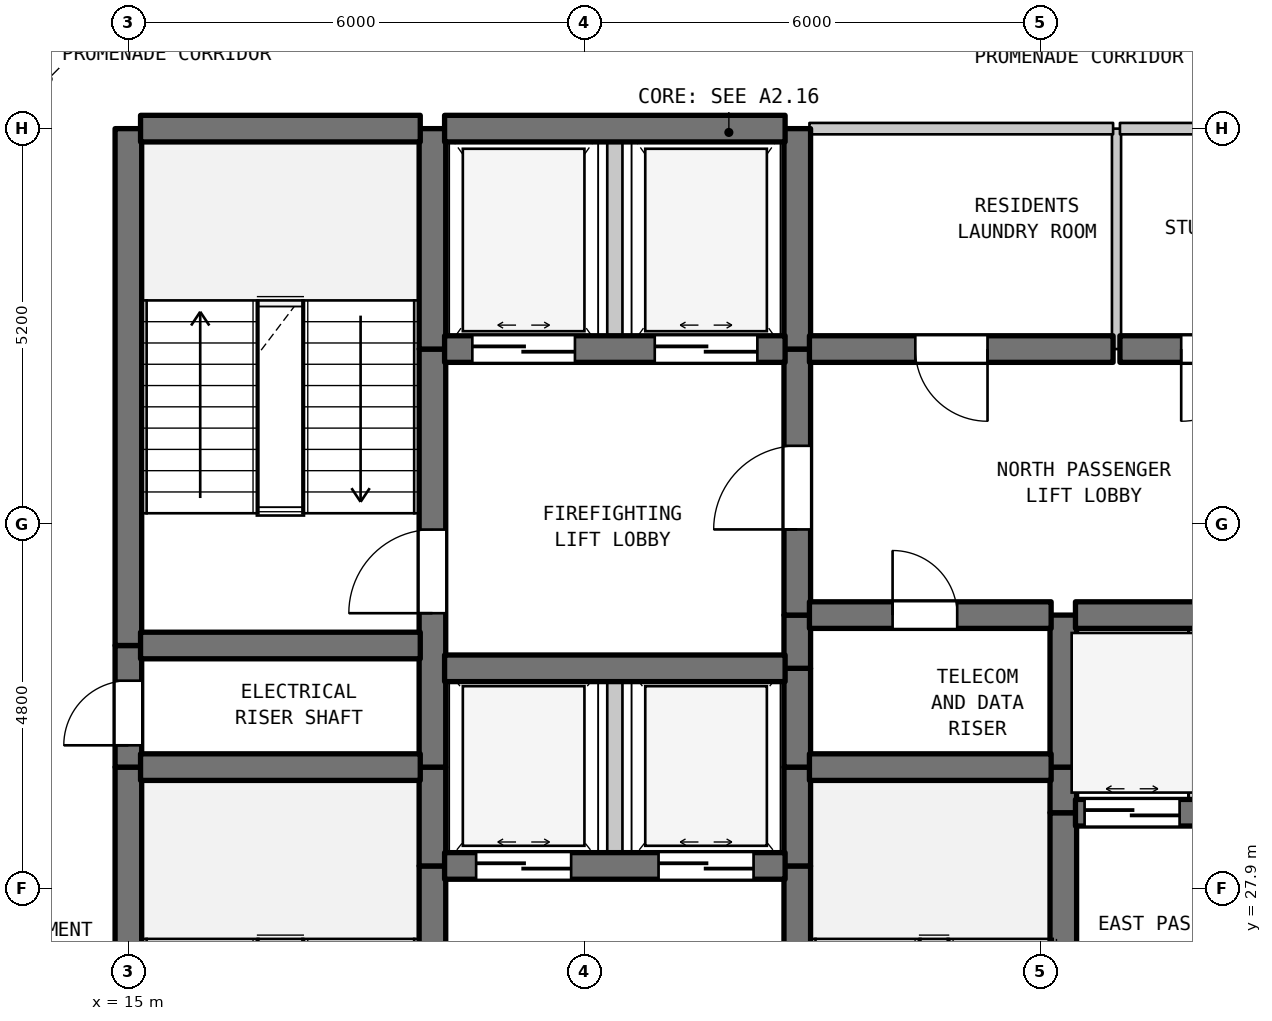
"""IFC4 building model, lengths in metres.
Left out: names, types, materials, properties, quantities, classifications, styles, units other than length and angle.
Written with IfcOpenShell. Run it as: python <this file> out.ifc"""

import sys

from ifc_helpers import new_model, si_unit, direction, frame, frame_2d, origin, place, context, subcontext, project, spatial, rectangle, extrude, element, fill, save


model = new_model("IFC4")
c1 = context("Model", 3, precision=1e-05, world=origin(), true_north=direction((0.0, 1.0)))
c2 = subcontext(c1, "Body", "Model", "MODEL_VIEW")
j1 = project(units=[si_unit("LENGTHUNIT", "METRE"), si_unit("PLANEANGLEUNIT", "RADIAN")], contexts=[c1])
p1 = place(None, origin())
s1 = spatial("IfcSite", under=j1, at=p1, CompositionType="ELEMENT")
p2 = place(p1, origin())
s2 = spatial("IfcBuilding", under=s1, at=p2, CompositionType="ELEMENT")
p3 = place(p2, frame((0.0, 0.0, 210.6)))
s3 = spatial("IfcBuildingStorey", under=s2, at=p3, CompositionType="ELEMENT", Elevation=210.6)
p4 = place(p3, frame((15.0, 22.7, 0.0), z_axis=(0.0, 0.0, 1.0), x_axis=(0.0, 1.0, 0.0)))
e1 = element("IfcWall", 1, at=p4, inside=s3, PredefinedType="SHEAR", context=c2, shape_type="SweptSolid", body=[
    extrude(rectangle(XDim=6.8, YDim=0.35, at=frame_2d((3.4, 0.0))), origin(), (0.0, 0.0, 1.0), 3.39),
])
p5 = place(p3, frame((15.0, 29.5, 0.0), z_axis=(0.0, 0.0, 1.0), x_axis=(0.0, 1.0, 0.0)))
e2 = element("IfcWall", 2, at=p5, inside=s3, PredefinedType="SHEAR", context=c2, shape_type="SweptSolid", body=[
    extrude(rectangle(XDim=1.6, YDim=0.35, at=frame_2d((0.8, 0.0))), origin(), (0.0, 0.0, 1.0), 3.39),
])
p6 = place(p5, frame((0.287, 0.0, 0.0)))
e3 = element("IfcOpeningElement", 3, at=p6, cuts=e2, PredefinedType="OPENING", context=c2, shape_type="SweptSolid", body=[
    extrude(rectangle(XDim=0.85, YDim=2.1, at=frame_2d((0.425, 1.05))), frame((0.0, 0.185, 0.0), z_axis=(0.0, -1.0, 0.0), x_axis=(1.0, 0.0, 0.0)), (0.0, 0.0, 1.0), 0.37),
])
p7 = place(p3, frame((15.0, 31.1, 0.0), z_axis=(0.0, 0.0, 1.0), x_axis=(0.0, 1.0, 0.0)))
e4 = element("IfcWall", 4, at=p7, inside=s3, PredefinedType="SHEAR", context=c2, shape_type="SweptSolid", body=[
    extrude(rectangle(XDim=6.8, YDim=0.35, at=frame_2d((3.4, 0.0))), origin(), (0.0, 0.0, 1.0), 3.39),
])
p8 = place(p3, frame((19.0, 22.7, 0.0), z_axis=(0.0, 0.0, 1.0), x_axis=(0.0, 1.0, 0.0)))
e5 = element("IfcWall", 5, at=p8, inside=s3, PredefinedType="SHEAR", context=c2, shape_type="SweptSolid", body=[
    extrude(rectangle(XDim=5.5, YDim=0.35, at=frame_2d((2.75, 0.0))), origin(), (0.0, 0.0, 1.0), 3.39),
])
p9 = place(p8, frame((0.631, 0.0, 0.0)))
e6 = element("IfcOpeningElement", 6, at=p9, cuts=e5, PredefinedType="OPENING", context=c2, shape_type="SweptSolid", body=[
    extrude(rectangle(XDim=1.1, YDim=2.15, at=frame_2d((0.55, 1.075))), frame((0.0, 0.185, 0.0), z_axis=(0.0, -1.0, 0.0), x_axis=(1.0, 0.0, 0.0)), (0.0, 0.0, 1.0), 0.37),
])
p10 = place(p3, frame((19.0, 28.2, 0.0), z_axis=(0.0, 0.0, 1.0), x_axis=(0.0, 1.0, 0.0)))
e7 = element("IfcWall", 7, at=p10, inside=s3, PredefinedType="SHEAR", context=c2, shape_type="SweptSolid", body=[
    extrude(rectangle(XDim=1.3, YDim=0.35, at=frame_2d((0.65, 0.0))), origin(), (0.0, 0.0, 1.0), 3.39),
])
p11 = place(p3, frame((19.0, 29.5, 0.0), z_axis=(0.0, 0.0, 1.0), x_axis=(0.0, 1.0, 0.0)))
e8 = element("IfcWall", 8, at=p11, inside=s3, PredefinedType="SHEAR", context=c2, shape_type="SweptSolid", body=[
    extrude(rectangle(XDim=5.5, YDim=0.35, at=frame_2d((2.75, 0.0))), origin(), (0.0, 0.0, 1.0), 3.39),
])
p12 = place(p11, frame((2.025, 0.0, 0.0)))
e9 = element("IfcOpeningElement", 9, at=p12, cuts=e8, PredefinedType="OPENING", context=c2, shape_type="SweptSolid", body=[
    extrude(rectangle(XDim=1.1, YDim=2.15, at=frame_2d((0.55, 1.075))), frame((0.0, 0.185, 0.0), z_axis=(0.0, -1.0, 0.0), x_axis=(1.0, 0.0, 0.0)), (0.0, 0.0, 1.0), 0.37),
])
p13 = place(p3, frame((19.0, 35.0, 0.0), z_axis=(0.0, 0.0, 1.0), x_axis=(0.0, 1.0, 0.0)))
e10 = element("IfcWall", 10, at=p13, inside=s3, PredefinedType="SHEAR", context=c2, shape_type="SweptSolid", body=[
    extrude(rectangle(XDim=2.9, YDim=0.35, at=frame_2d((1.45, 0.0))), origin(), (0.0, 0.0, 1.0), 3.39),
])
p14 = place(p3, frame((21.4, 28.2, 0.0), z_axis=(0.0, 0.0, 1.0), x_axis=(0.0, 1.0, 0.0)))
e11 = element("IfcWall", 11, at=p14, inside=s3, PredefinedType="STANDARD", context=c2, shape_type="SweptSolid", body=[
    extrude(rectangle(XDim=2.6, YDim=0.2, at=frame_2d((1.3, 0.0))), origin(), (0.0, 0.0, 1.0), 3.39),
])
p15 = place(p3, frame((21.4, 35.0, 0.0), z_axis=(0.0, 0.0, 1.0), x_axis=(0.0, 1.0, 0.0)))
e12 = element("IfcWall", 12, at=p15, inside=s3, PredefinedType="STANDARD", context=c2, shape_type="SweptSolid", body=[
    extrude(rectangle(XDim=2.9, YDim=0.2, at=frame_2d((1.45, 0.0))), origin(), (0.0, 0.0, 1.0), 3.39),
])
p16 = place(p3, frame((23.8, 22.7, 0.0), z_axis=(0.0, 0.0, 1.0), x_axis=(0.0, 1.0, 0.0)))
e13 = element("IfcWall", 13, at=p16, inside=s3, PredefinedType="SHEAR", context=c2, shape_type="SweptSolid", body=[
    extrude(rectangle(XDim=5.5, YDim=0.35, at=frame_2d((2.75, 0.0))), origin(), (0.0, 0.0, 1.0), 3.39),
])
p17 = place(p16, frame((0.235, 0.0, 0.0)))
e14 = element("IfcOpeningElement", 14, at=p17, cuts=e13, PredefinedType="OPENING", context=c2, shape_type="SweptSolid", body=[
    extrude(rectangle(XDim=1.1, YDim=2.15, at=frame_2d((0.55, 1.075))), frame((0.0, 0.185, 0.0), z_axis=(0.0, -1.0, 0.0), x_axis=(1.0, 0.0, 0.0)), (0.0, 0.0, 1.0), 0.37),
])
for number, where, z_axis, x_axis in (
    (15, (23.8, 28.2, 0.0), (0.0, 0.0, 1.0), (0.0, 1.0, 0.0)),
    (16, (23.8, 29.5, 0.0), (0.0, 0.0, 1.0), (0.0, 1.0, 0.0)),
):
    element("IfcWall", number, at=place(p3, frame(where, z_axis=z_axis, x_axis=x_axis)), inside=s3, PredefinedType="SHEAR", context=c2, shape_type="SweptSolid", body=[
        extrude(rectangle(XDim=1.3, YDim=0.35, at=frame_2d((0.65, 0.0))), origin(), (0.0, 0.0, 1.0), 3.39),
    ])
p18 = place(p3, frame((23.8, 30.8, 0.0), z_axis=(0.0, 0.0, 1.0), x_axis=(0.0, 1.0, 0.0)))
e17 = element("IfcWall", 17, at=p18, inside=s3, PredefinedType="SHEAR", context=c2, shape_type="SweptSolid", body=[
    extrude(rectangle(XDim=0.7, YDim=0.35, at=frame_2d((0.35, 0.0))), origin(), (0.0, 0.0, 1.0), 3.39),
])
p19 = place(p3, frame((23.8, 31.5, 0.0), z_axis=(0.0, 0.0, 1.0), x_axis=(0.0, 1.0, 0.0)))
e18 = element("IfcWall", 18, at=p19, inside=s3, PredefinedType="SHEAR", context=c2, shape_type="SweptSolid", body=[
    extrude(rectangle(XDim=3.5, YDim=0.35, at=frame_2d((1.75, 0.0))), origin(), (0.0, 0.0, 1.0), 3.39),
])
p20 = place(p19, frame((1.127, 0.0, 0.0)))
e19 = element("IfcOpeningElement", 19, at=p20, cuts=e18, PredefinedType="OPENING", context=c2, shape_type="SweptSolid", body=[
    extrude(rectangle(XDim=1.1, YDim=2.15, at=frame_2d((0.55, 1.075))), frame((0.0, 0.185, 0.0), z_axis=(0.0, -1.0, 0.0), x_axis=(1.0, 0.0, 0.0)), (0.0, 0.0, 1.0), 0.37),
])
p21 = place(p3, frame((23.8, 35.0, 0.0), z_axis=(0.0, 0.0, 1.0), x_axis=(0.0, 1.0, 0.0)))
e20 = element("IfcWall", 20, at=p21, inside=s3, PredefinedType="SHEAR", context=c2, shape_type="SweptSolid", body=[
    extrude(rectangle(XDim=2.9, YDim=0.35, at=frame_2d((1.45, 0.0))), origin(), (0.0, 0.0, 1.0), 3.39),
])
p22 = place(p3, frame((27.3, 25.6, 0.0), z_axis=(0.0, 0.0, 1.0), x_axis=(0.0, 1.0, 0.0)))
e21 = element("IfcWall", 21, at=p22, inside=s3, PredefinedType="SHEAR", context=c2, shape_type="SweptSolid", body=[
    extrude(rectangle(XDim=3.3, YDim=0.35, at=frame_2d((1.65, 0.0))), origin(), (0.0, 0.0, 1.0), 3.39),
])
p23 = place(p3, frame((27.3, 28.9, 0.0), z_axis=(0.0, 0.0, 1.0), x_axis=(0.0, 1.0, 0.0)))
e22 = element("IfcWall", 22, at=p23, inside=s3, PredefinedType="SHEAR", context=c2, shape_type="SweptSolid", body=[
    extrude(rectangle(XDim=0.6, YDim=0.35, at=frame_2d((0.3, 0.0))), origin(), (0.0, 0.0, 1.0), 3.39),
])
p24 = place(p3, frame((27.3, 29.5, 0.0), z_axis=(0.0, 0.0, 1.0), x_axis=(0.0, 1.0, 0.0)))
e23 = element("IfcWall", 23, at=p24, inside=s3, PredefinedType="SHEAR", context=c2, shape_type="SweptSolid", body=[
    extrude(rectangle(XDim=2.0, YDim=0.35, at=frame_2d((1.0, 0.0))), origin(), (0.0, 0.0, 1.0), 3.39),
])
p25 = place(p3, frame((28.0, 35.0, 0.0), z_axis=(0.0, 0.0, 1.0), x_axis=(0.0, 1.0, 0.0)))
e24 = element("IfcWall", 24, at=p25, inside=s3, PredefinedType="PARTITIONING", context=c2, shape_type="SweptSolid", body=[
    extrude(rectangle(XDim=2.9, YDim=0.12, at=frame_2d((1.45, 0.0))), origin(), (0.0, 0.0, 1.0), 3.39),
])
p26 = place(p3, frame((29.05, 28.9, 0.0), z_axis=(0.0, 0.0, 1.0), x_axis=(0.0, 1.0, 0.0)))
e25 = element("IfcWall", 25, at=p26, inside=s3, PredefinedType="STANDARD", context=c2, shape_type="SweptSolid", body=[
    extrude(rectangle(XDim=2.6, YDim=0.2, at=frame_2d((1.3, 0.0))), origin(), (0.0, 0.0, 1.0), 3.39),
])
p27 = place(p3, frame((19.16, 28.2, 0.0), z_axis=(0.0, 0.0, 1.0), x_axis=(1.0, 0.0, 0.0)))
e26 = element("IfcWall", 26, at=p27, inside=s3, PredefinedType="SHEAR", context=c2, shape_type="SweptSolid", body=[
    extrude(rectangle(XDim=4.48, YDim=0.35, at=frame_2d((2.24, 0.0))), origin(), (0.0, 0.0, 1.0), 3.39),
])
p28 = place(p27, frame((0.415, 0.0, 0.0)))
e27 = element("IfcOpeningElement", 27, at=p28, cuts=e26, PredefinedType="OPENING", context=c2, shape_type="SweptSolid", body=[
    extrude(rectangle(XDim=1.25, YDim=2.2, at=frame_2d((0.625, 1.1))), frame((0.0, 0.185, 0.0), z_axis=(0.0, -1.0, 0.0), x_axis=(1.0, 0.0, 0.0)), (0.0, 0.0, 1.0), 0.37),
])
p29 = place(p27, frame((2.815, 0.0, 0.0)))
e28 = element("IfcOpeningElement", 28, at=p29, cuts=e26, PredefinedType="OPENING", context=c2, shape_type="SweptSolid", body=[
    extrude(rectangle(XDim=1.25, YDim=2.2, at=frame_2d((0.625, 1.1))), frame((0.0, 0.185, 0.0), z_axis=(0.0, -1.0, 0.0), x_axis=(1.0, 0.0, 0.0)), (0.0, 0.0, 1.0), 0.37),
])
p30 = place(p3, frame((27.46, 28.9, 0.0), z_axis=(0.0, 0.0, 1.0), x_axis=(1.0, 0.0, 0.0)))
e29 = element("IfcWall", 29, at=p30, inside=s3, PredefinedType="SHEAR", context=c2, shape_type="SweptSolid", body=[
    extrude(rectangle(XDim=3.18, YDim=0.35, at=frame_2d((1.59, 0.0))), origin(), (0.0, 0.0, 1.0), 3.39),
])
p31 = place(p30, frame((0.12, 0.0, 0.0)))
e30 = element("IfcOpeningElement", 30, at=p31, cuts=e29, PredefinedType="OPENING", context=c2, shape_type="SweptSolid", body=[
    extrude(rectangle(XDim=1.25, YDim=2.2, at=frame_2d((0.625, 1.1))), frame((0.0, 0.185, 0.0), z_axis=(0.0, -1.0, 0.0), x_axis=(1.0, 0.0, 0.0)), (0.0, 0.0, 1.0), 0.37),
])
p32 = place(p30, frame((1.81, 0.0, 0.0)))
e31 = element("IfcOpeningElement", 31, at=p32, cuts=e29, PredefinedType="OPENING", context=c2, shape_type="SweptSolid", body=[
    extrude(rectangle(XDim=1.25, YDim=2.2, at=frame_2d((0.625, 1.1))), frame((0.0, 0.185, 0.0), z_axis=(0.0, -1.0, 0.0), x_axis=(1.0, 0.0, 0.0)), (0.0, 0.0, 1.0), 0.37),
])
p33 = place(p3, frame((15.16, 29.5, 0.0), z_axis=(0.0, 0.0, 1.0), x_axis=(1.0, 0.0, 0.0)))
e32 = element("IfcWall", 32, at=p33, inside=s3, PredefinedType="SHEAR", context=c2, shape_type="SweptSolid", body=[
    extrude(rectangle(XDim=3.68, YDim=0.35, at=frame_2d((1.84, 0.0))), origin(), (0.0, 0.0, 1.0), 3.39),
])
p34 = place(p3, frame((23.96, 29.5, 0.0), z_axis=(0.0, 0.0, 1.0), x_axis=(1.0, 0.0, 0.0)))
e33 = element("IfcWall", 33, at=p34, inside=s3, PredefinedType="SHEAR", context=c2, shape_type="SweptSolid", body=[
    extrude(rectangle(XDim=3.18, YDim=0.35, at=frame_2d((1.59, 0.0))), origin(), (0.0, 0.0, 1.0), 3.39),
])
p35 = place(p3, frame((19.16, 30.8, 0.0), z_axis=(0.0, 0.0, 1.0), x_axis=(1.0, 0.0, 0.0)))
e34 = element("IfcWall", 34, at=p35, inside=s3, PredefinedType="SHEAR", context=c2, shape_type="SweptSolid", body=[
    extrude(rectangle(XDim=4.48, YDim=0.35, at=frame_2d((2.24, 0.0))), origin(), (0.0, 0.0, 1.0), 3.39),
])
p36 = place(p3, frame((15.16, 31.1, 0.0), z_axis=(0.0, 0.0, 1.0), x_axis=(1.0, 0.0, 0.0)))
e35 = element("IfcWall", 35, at=p36, inside=s3, PredefinedType="SHEAR", context=c2, shape_type="SweptSolid", body=[
    extrude(rectangle(XDim=3.68, YDim=0.35, at=frame_2d((1.84, 0.0))), origin(), (0.0, 0.0, 1.0), 3.39),
])
p37 = place(p3, frame((23.96, 31.5, 0.0), z_axis=(0.0, 0.0, 1.0), x_axis=(1.0, 0.0, 0.0)))
e36 = element("IfcWall", 36, at=p37, inside=s3, PredefinedType="SHEAR", context=c2, shape_type="SweptSolid", body=[
    extrude(rectangle(XDim=3.18, YDim=0.35, at=frame_2d((1.59, 0.0))), origin(), (0.0, 0.0, 1.0), 3.39),
])
p38 = place(p37, frame((1.094, 0.0, 0.0)))
e37 = element("IfcOpeningElement", 37, at=p38, cuts=e36, PredefinedType="OPENING", context=c2, shape_type="SweptSolid", body=[
    extrude(rectangle(XDim=0.85, YDim=2.1, at=frame_2d((0.425, 1.05))), frame((0.0, 0.185, 0.0), z_axis=(0.0, -1.0, 0.0), x_axis=(1.0, 0.0, 0.0)), (0.0, 0.0, 1.0), 0.37),
])
p39 = place(p3, frame((27.46, 31.5, 0.0), z_axis=(0.0, 0.0, 1.0), x_axis=(1.0, 0.0, 0.0)))
e38 = element("IfcWall", 38, at=p39, inside=s3, PredefinedType="SHEAR", context=c2, shape_type="SweptSolid", body=[
    extrude(rectangle(XDim=3.18, YDim=0.35, at=frame_2d((1.59, 0.0))), origin(), (0.0, 0.0, 1.0), 3.39),
])
p40 = place(p3, frame((19.16, 35.0, 0.0), z_axis=(0.0, 0.0, 1.0), x_axis=(1.0, 0.0, 0.0)))
e39 = element("IfcWall", 39, at=p40, inside=s3, PredefinedType="SHEAR", context=c2, shape_type="SweptSolid", body=[
    extrude(rectangle(XDim=4.48, YDim=0.35, at=frame_2d((2.24, 0.0))), origin(), (0.0, 0.0, 1.0), 3.39),
])
p41 = place(p40, frame((0.365, 0.0, 0.0)))
e40 = element("IfcOpeningElement", 40, at=p41, cuts=e39, PredefinedType="OPENING", context=c2, shape_type="SweptSolid", body=[
    extrude(rectangle(XDim=1.35, YDim=2.2, at=frame_2d((0.675, 1.1))), frame((0.0, 0.185, 0.0), z_axis=(0.0, -1.0, 0.0), x_axis=(1.0, 0.0, 0.0)), (0.0, 0.0, 1.0), 0.37),
])
p42 = place(p40, frame((2.765, 0.0, 0.0)))
e41 = element("IfcOpeningElement", 41, at=p42, cuts=e39, PredefinedType="OPENING", context=c2, shape_type="SweptSolid", body=[
    extrude(rectangle(XDim=1.35, YDim=2.2, at=frame_2d((0.675, 1.1))), frame((0.0, 0.185, 0.0), z_axis=(0.0, -1.0, 0.0), x_axis=(1.0, 0.0, 0.0)), (0.0, 0.0, 1.0), 0.37),
])
p43 = place(p3, frame((23.96, 35.0, 0.0), z_axis=(0.0, 0.0, 1.0), x_axis=(1.0, 0.0, 0.0)))
e42 = element("IfcWall", 42, at=p43, inside=s3, PredefinedType="SHEAR", context=c2, shape_type="SweptSolid", body=[
    extrude(rectangle(XDim=3.995, YDim=0.35, at=frame_2d((1.998, 0.0))), origin(), (0.0, 0.0, 1.0), 3.39),
])
p44 = place(p43, frame((1.393, 0.0, 0.0)))
e43 = element("IfcOpeningElement", 43, at=p44, cuts=e42, PredefinedType="OPENING", context=c2, shape_type="SweptSolid", body=[
    extrude(rectangle(XDim=0.95, YDim=2.15, at=frame_2d((0.475, 1.075))), frame((0.0, 0.185, 0.0), z_axis=(0.0, -1.0, 0.0), x_axis=(1.0, 0.0, 0.0)), (0.0, 0.0, 1.0), 0.37),
])
p45 = place(p3, frame((28.045, 35.0, 0.0), z_axis=(0.0, 0.0, 1.0), x_axis=(1.0, 0.0, 0.0)))
e44 = element("IfcWall", 44, at=p45, inside=s3, PredefinedType="SHEAR", context=c2, shape_type="SweptSolid", body=[
    extrude(rectangle(XDim=2.595, YDim=0.35, at=frame_2d((1.297, 0.0))), origin(), (0.0, 0.0, 1.0), 3.39),
])
p46 = place(p45, frame((0.806, 0.0, 0.0)))
e45 = element("IfcOpeningElement", 45, at=p46, cuts=e44, PredefinedType="OPENING", context=c2, shape_type="SweptSolid", body=[
    extrude(rectangle(XDim=0.95, YDim=2.15, at=frame_2d((0.475, 1.075))), frame((0.0, 0.185, 0.0), z_axis=(0.0, -1.0, 0.0), x_axis=(1.0, 0.0, 0.0)), (0.0, 0.0, 1.0), 0.37),
])
p47 = place(p3, frame((15.16, 37.9, 0.0), z_axis=(0.0, 0.0, 1.0), x_axis=(1.0, 0.0, 0.0)))
e46 = element("IfcWall", 46, at=p47, inside=s3, PredefinedType="SHEAR", context=c2, shape_type="SweptSolid", body=[
    extrude(rectangle(XDim=3.68, YDim=0.35, at=frame_2d((1.84, 0.0))), origin(), (0.0, 0.0, 1.0), 3.39),
])
p48 = place(p3, frame((19.16, 37.9, 0.0), z_axis=(0.0, 0.0, 1.0), x_axis=(1.0, 0.0, 0.0)))
e47 = element("IfcWall", 47, at=p48, inside=s3, PredefinedType="SHEAR", context=c2, shape_type="SweptSolid", body=[
    extrude(rectangle(XDim=4.48, YDim=0.35, at=frame_2d((2.24, 0.0))), origin(), (0.0, 0.0, 1.0), 3.39),
])
p49 = place(p3, frame((23.96, 37.9, 0.0), z_axis=(0.0, 0.0, 1.0), x_axis=(1.0, 0.0, 0.0)))
e48 = element("IfcWall", 48, at=p49, inside=s3, PredefinedType="STANDARD", context=c2, shape_type="SweptSolid", body=[
    extrude(rectangle(XDim=3.995, YDim=0.15, at=frame_2d((1.998, 0.0))), origin(), (0.0, 0.0, 1.0), 2.89),
])
p50 = place(p3, frame((28.045, 37.9, 0.0), z_axis=(0.0, 0.0, 1.0), x_axis=(1.0, 0.0, 0.0)))
e49 = element("IfcWall", 49, at=p50, inside=s3, PredefinedType="STANDARD", context=c2, shape_type="SweptSolid", body=[
    extrude(rectangle(XDim=2.695, YDim=0.15, at=frame_2d((1.348, 0.0))), origin(), (0.0, 0.0, 1.0), 2.89),
])
p51 = place(p6, origin())
e50 = element("IfcDoor", 50, at=p51, inside=s3, OperationType="SINGLE_SWING_LEFT", PredefinedType="DOOR", context=c2, shape_type="SweptSolid", body=[
    extrude(rectangle(XDim=0.85, YDim=2.1, at=frame_2d((0.425, 1.05))), frame((0.0, 0.025, 0.0), z_axis=(0.0, -1.0, 0.0), x_axis=(1.0, 0.0, 0.0)), (0.0, 0.0, 1.0), 0.05),
])
fill(e3, e50)
p52 = place(p12, origin())
e51 = element("IfcDoor", 51, at=p52, inside=s3, OperationType="SINGLE_SWING_LEFT", PredefinedType="DOOR", context=c2, shape_type="SweptSolid", body=[
    extrude(rectangle(XDim=1.1, YDim=2.15, at=frame_2d((0.55, 1.075))), frame((0.0, 0.025, 0.0), z_axis=(0.0, -1.0, 0.0), x_axis=(1.0, 0.0, 0.0)), (0.0, 0.0, 1.0), 0.05),
])
fill(e9, e51)
p53 = place(p20, origin())
e52 = element("IfcDoor", 52, at=p53, inside=s3, OperationType="SINGLE_SWING_LEFT", PredefinedType="DOOR", context=c2, shape_type="SweptSolid", body=[
    extrude(rectangle(XDim=1.1, YDim=2.15, at=frame_2d((0.55, 1.075))), frame((0.0, 0.025, 0.0), z_axis=(0.0, -1.0, 0.0), x_axis=(1.0, 0.0, 0.0)), (0.0, 0.0, 1.0), 0.05),
])
fill(e19, e52)
p54 = place(p28, origin())
e53 = element("IfcDoor", 53, at=p54, inside=s3, OperationType="DOUBLE_DOOR_SLIDING", PredefinedType="DOOR", context=c2, shape_type="SweptSolid", body=[
    extrude(rectangle(XDim=1.25, YDim=2.2, at=frame_2d((0.625, 1.1))), frame((0.0, 0.025, 0.0), z_axis=(0.0, -1.0, 0.0), x_axis=(1.0, 0.0, 0.0)), (0.0, 0.0, 1.0), 0.05),
])
fill(e27, e53)
p55 = place(p29, origin())
e54 = element("IfcDoor", 54, at=p55, inside=s3, OperationType="DOUBLE_DOOR_SLIDING", PredefinedType="DOOR", context=c2, shape_type="SweptSolid", body=[
    extrude(rectangle(XDim=1.25, YDim=2.2, at=frame_2d((0.625, 1.1))), frame((0.0, 0.025, 0.0), z_axis=(0.0, -1.0, 0.0), x_axis=(1.0, 0.0, 0.0)), (0.0, 0.0, 1.0), 0.05),
])
fill(e28, e54)
p56 = place(p31, origin())
e55 = element("IfcDoor", 55, at=p56, inside=s3, OperationType="DOUBLE_DOOR_SLIDING", PredefinedType="DOOR", context=c2, shape_type="SweptSolid", body=[
    extrude(rectangle(XDim=1.25, YDim=2.2, at=frame_2d((0.625, 1.1))), frame((0.0, 0.025, 0.0), z_axis=(0.0, -1.0, 0.0), x_axis=(1.0, 0.0, 0.0)), (0.0, 0.0, 1.0), 0.05),
])
fill(e30, e55)
p57 = place(p38, origin())
e56 = element("IfcDoor", 56, at=p57, inside=s3, OperationType="SINGLE_SWING_LEFT", PredefinedType="DOOR", context=c2, shape_type="SweptSolid", body=[
    extrude(rectangle(XDim=0.85, YDim=2.1, at=frame_2d((0.425, 1.05))), frame((0.0, 0.025, 0.0), z_axis=(0.0, -1.0, 0.0), x_axis=(1.0, 0.0, 0.0)), (0.0, 0.0, 1.0), 0.05),
])
fill(e37, e56)
p58 = place(p41, origin())
e57 = element("IfcDoor", 57, at=p58, inside=s3, OperationType="DOUBLE_DOOR_SLIDING", PredefinedType="DOOR", context=c2, shape_type="SweptSolid", body=[
    extrude(rectangle(XDim=1.35, YDim=2.2, at=frame_2d((0.675, 1.1))), frame((0.0, 0.025, 0.0), z_axis=(0.0, -1.0, 0.0), x_axis=(1.0, 0.0, 0.0)), (0.0, 0.0, 1.0), 0.05),
])
fill(e40, e57)
p59 = place(p42, origin())
e58 = element("IfcDoor", 58, at=p59, inside=s3, OperationType="DOUBLE_DOOR_SLIDING", PredefinedType="DOOR", context=c2, shape_type="SweptSolid", body=[
    extrude(rectangle(XDim=1.35, YDim=2.2, at=frame_2d((0.675, 1.1))), frame((0.0, 0.025, 0.0), z_axis=(0.0, -1.0, 0.0), x_axis=(1.0, 0.0, 0.0)), (0.0, 0.0, 1.0), 0.05),
])
fill(e41, e58)
p60 = place(p44, frame((0.95, 0.0, 0.0), z_axis=(0.0, 0.0, 1.0), x_axis=(-1.0, 0.0, 0.0)))
e59 = element("IfcDoor", 59, at=p60, inside=s3, OperationType="SINGLE_SWING_RIGHT", PredefinedType="DOOR", context=c2, shape_type="SweptSolid", body=[
    extrude(rectangle(XDim=0.95, YDim=2.15, at=frame_2d((0.475, 1.075))), frame((0.0, 0.025, 0.0), z_axis=(0.0, -1.0, 0.0), x_axis=(1.0, 0.0, 0.0)), (0.0, 0.0, 1.0), 0.05),
])
fill(e43, e59)
p61 = place(p46, frame((0.95, 0.0, 0.0), z_axis=(0.0, 0.0, 1.0), x_axis=(-1.0, 0.0, 0.0)))
e60 = element("IfcDoor", 60, at=p61, inside=s3, OperationType="SINGLE_SWING_LEFT", PredefinedType="DOOR", context=c2, shape_type="SweptSolid", body=[
    extrude(rectangle(XDim=0.95, YDim=2.15, at=frame_2d((0.475, 1.075))), frame((0.0, 0.025, 0.0), z_axis=(0.0, -1.0, 0.0), x_axis=(1.0, 0.0, 0.0)), (0.0, 0.0, 1.0), 0.05),
])
fill(e45, e60)
save(model, sys.argv[1])
